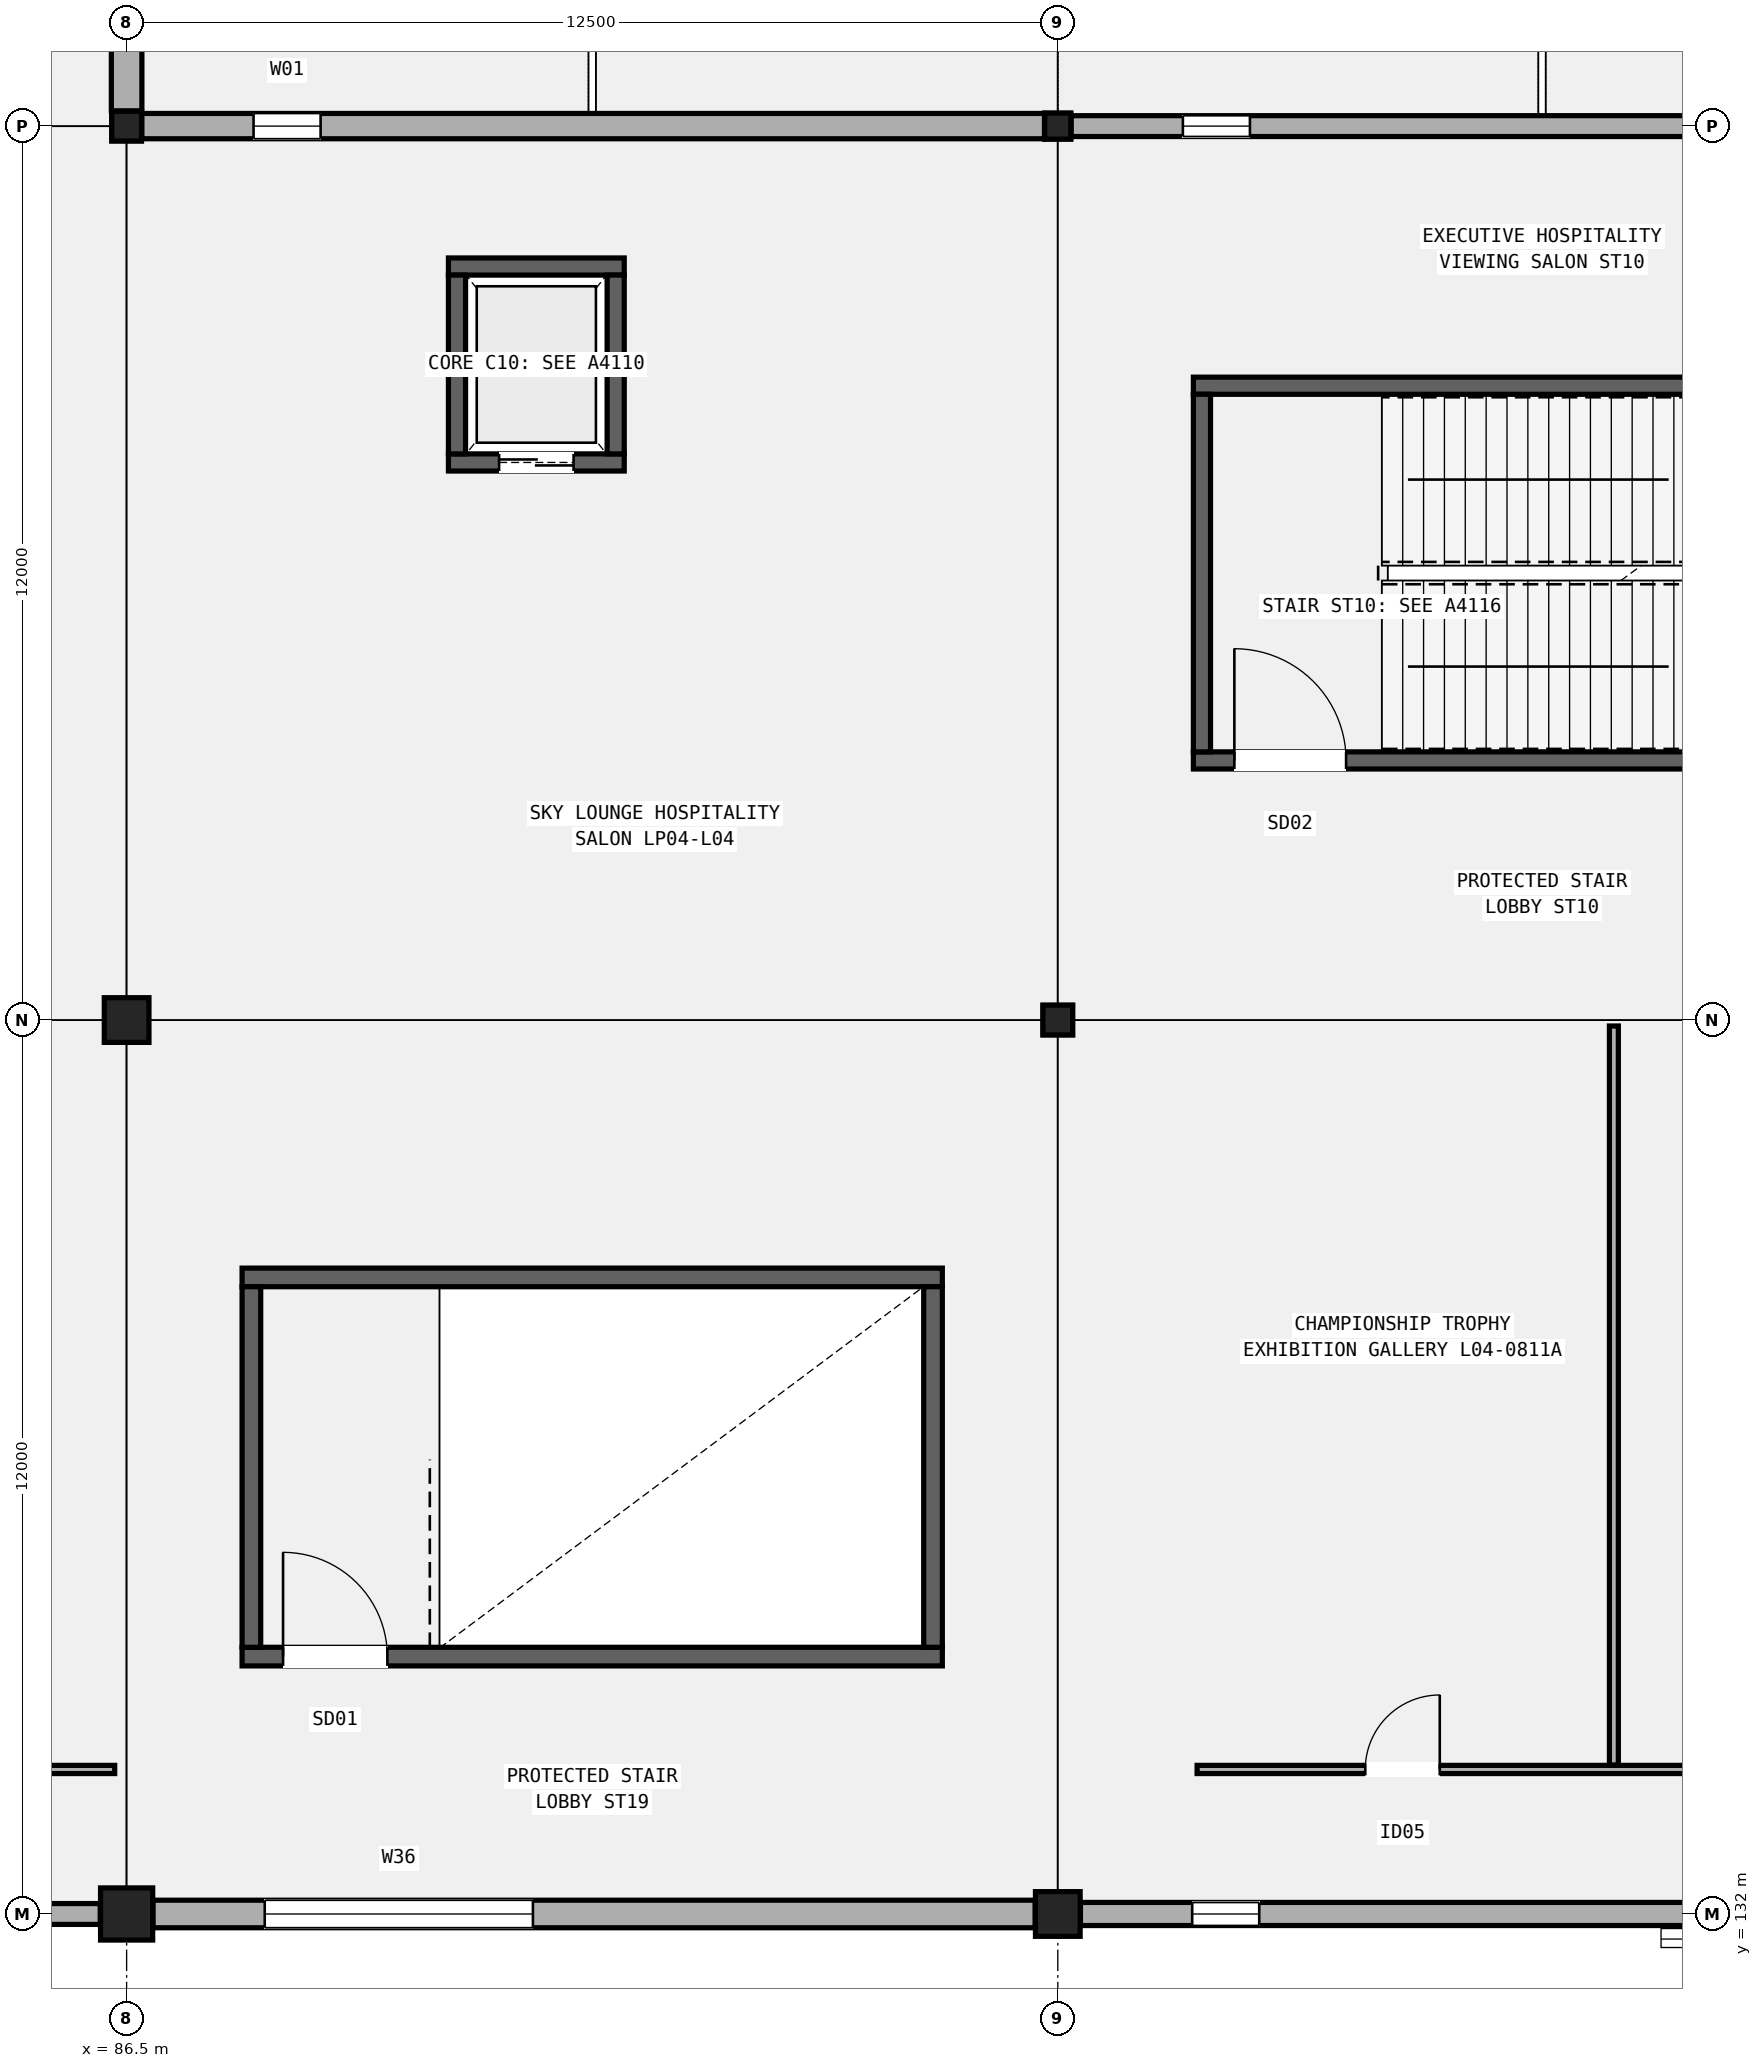
"""IFC4 building model, lengths in metres.
Left out: names, types, materials, properties, quantities, classifications, styles, units other than length and angle.
Written with IfcOpenShell. Run it as: python <this file> out.ifc"""

import sys

from ifc_helpers import new_model, si_unit, direction, frame, frame_2d, origin, origin_2d, place, context, subcontext, project, spatial, rectangle, hollow_rectangle, extrude, element, fill, save


model = new_model("IFC4")
c1 = context("Model", 3, precision=1e-05, world=origin(), true_north=direction((0.0, 1.0)))
c2 = subcontext(c1, "Body", "Model", "MODEL_VIEW")
j1 = project(units=[si_unit("LENGTHUNIT", "METRE"), si_unit("PLANEANGLEUNIT", "RADIAN")], contexts=[c1])
p1 = place(None, origin())
s1 = spatial("IfcSite", under=j1, at=p1, CompositionType="ELEMENT")
p2 = place(p1, origin())
s2 = spatial("IfcBuilding", under=s1, at=p2, CompositionType="ELEMENT")
p3 = place(p2, frame((0.0, 0.0, 20.4)))
s3 = spatial("IfcBuildingStorey", under=s2, at=p3, CompositionType="ELEMENT", Elevation=20.4)
p4 = place(p3, frame((86.5, 132.0, 0.0), z_axis=(0.0, 0.0, 1.0), x_axis=(1.0, 0.0, 0.0)))
e1 = element("IfcColumn", 1, at=p4, inside=s3, PredefinedType="COLUMN", context=c2, shape_type="SweptSolid", body=[
    extrude(rectangle(XDim=0.7, YDim=0.7, at=origin_2d()), origin(), (0.0, 0.0, 1.0), 5.4),
])
p5 = place(p3, frame((86.5, 144.0, 0.0), z_axis=(0.0, 0.0, 1.0), x_axis=(1.0, 0.0, 0.0)))
e2 = element("IfcColumn", 2, at=p5, inside=s3, PredefinedType="COLUMN", context=c2, shape_type="SweptSolid", body=[
    extrude(rectangle(XDim=0.6, YDim=0.6, at=origin_2d()), origin(), (0.0, 0.0, 1.0), 5.4),
])
p6 = place(p3, frame((86.5, 156.0, 0.0), z_axis=(0.0, 0.0, 1.0), x_axis=(1.0, 0.0, 0.0)))
e3 = element("IfcColumn", 3, at=p6, inside=s3, PredefinedType="COLUMN", context=c2, shape_type="SweptSolid", body=[
    extrude(hollow_rectangle(XDim=0.4, YDim=0.4, WallThickness=0.016, InnerFilletRadius=0.016, OuterFilletRadius=0.032, at=origin_2d()), origin(), (0.0, 0.0, 1.0), 5.4),
])
p7 = place(p3, frame((99.0, 132.0, 0.0), z_axis=(0.0, 0.0, 1.0), x_axis=(1.0, 0.0, 0.0)))
e4 = element("IfcColumn", 4, at=p7, inside=s3, PredefinedType="COLUMN", context=c2, shape_type="SweptSolid", body=[
    extrude(rectangle(XDim=0.6, YDim=0.6, at=origin_2d()), origin(), (0.0, 0.0, 1.0), 5.4),
])
p8 = place(p3, frame((99.0, 144.0, 0.0), z_axis=(0.0, 0.0, 1.0), x_axis=(1.0, 0.0, 0.0)))
e5 = element("IfcColumn", 5, at=p8, inside=s3, PredefinedType="COLUMN", context=c2, shape_type="SweptSolid", body=[
    extrude(hollow_rectangle(XDim=0.4, YDim=0.4, WallThickness=0.016, InnerFilletRadius=0.016, OuterFilletRadius=0.032, at=origin_2d()), origin(), (0.0, 0.0, 1.0), 5.4),
])
p9 = place(p3, frame((99.0, 156.0, 0.0), z_axis=(0.0, 0.0, 1.0), x_axis=(1.0, 0.0, 0.0)))
e6 = element("IfcColumn", 6, at=p9, inside=s3, PredefinedType="COLUMN", context=c2, shape_type="SweptSolid", body=[
    extrude(hollow_rectangle(XDim=0.35, YDim=0.35, WallThickness=0.016, InnerFilletRadius=0.016, OuterFilletRadius=0.032, at=origin_2d()), origin(), (0.0, 0.0, 1.0), 5.4),
])
p10 = place(p3, frame((74.179, 132.0, 0.0), z_axis=(0.0, 0.0, 1.0), x_axis=(1.0, 0.0, 0.0)))
e7 = element("IfcWall", 7, at=p10, inside=s3, PredefinedType="SOLIDWALL", context=c2, shape_type="SweptSolid", body=[
    extrude(rectangle(XDim=11.967, YDim=0.28, at=frame_2d((5.983, 0.0))), origin(), (0.0, 0.0, 1.0), 4.592),
])
p11 = place(p10, frame((1.5, 0.0, 0.95)))
e8 = element("IfcOpeningElement", 8, at=p11, cuts=e7, PredefinedType="OPENING", context=c2, shape_type="SweptSolid", body=[
    extrude(rectangle(XDim=3.3, YDim=1.8, at=frame_2d((1.65, 0.9))), frame((0.0, 0.15, 0.0), z_axis=(0.0, -1.0, 0.0), x_axis=(1.0, 0.0, 0.0)), (0.0, 0.0, 1.0), 0.3),
])
p12 = place(p3, frame((86.5, 156.204, 0.0), z_axis=(0.0, 0.0, 1.0), x_axis=(0.0, 1.0, 0.0)))
e9 = element("IfcWall", 9, at=p12, inside=s3, PredefinedType="SOLIDWALL", context=c2, shape_type="SweptSolid", body=[
    extrude(rectangle(XDim=11.617, YDim=0.41, at=frame_2d((5.809, 0.0))), origin(), (0.0, 0.0, 1.0), 4.592),
])
p13 = place(p12, frame((2.366, 0.0, 0.95)))
e10 = element("IfcOpeningElement", 10, at=p13, cuts=e9, PredefinedType="OPENING", context=c2, shape_type="SweptSolid", body=[
    extrude(rectangle(XDim=3.6, YDim=1.75, at=frame_2d((1.8, 0.875))), frame((0.0, 0.215, 0.0), z_axis=(0.0, -1.0, 0.0), x_axis=(1.0, 0.0, 0.0)), (0.0, 0.0, 1.0), 0.43),
])
p14 = place(p3, frame((86.854, 132.0, 0.0), z_axis=(0.0, 0.0, 1.0), x_axis=(1.0, 0.0, 0.0)))
e11 = element("IfcWall", 11, at=p14, inside=s3, PredefinedType="SOLIDWALL", context=c2, shape_type="SweptSolid", body=[
    extrude(rectangle(XDim=11.842, YDim=0.37, at=frame_2d((5.921, 0.0))), origin(), (0.0, 0.0, 1.0), 4.48),
])
p15 = place(p14, frame((1.5, 0.0, 0.95)))
e12 = element("IfcOpeningElement", 12, at=p15, cuts=e11, PredefinedType="OPENING", context=c2, shape_type="SweptSolid", body=[
    extrude(rectangle(XDim=3.6, YDim=2.15, at=frame_2d((1.8, 1.075))), frame((0.0, 0.195, 0.0), z_axis=(0.0, -1.0, 0.0), x_axis=(1.0, 0.0, 0.0)), (0.0, 0.0, 1.0), 0.39),
])
p16 = place(p3, frame((86.704, 156.0, 0.0), z_axis=(0.0, 0.0, 1.0), x_axis=(1.0, 0.0, 0.0)))
e13 = element("IfcWall", 13, at=p16, inside=s3, PredefinedType="SOLIDWALL", context=c2, shape_type="SweptSolid", body=[
    extrude(rectangle(XDim=12.117, YDim=0.34, at=frame_2d((6.059, 0.0))), origin(), (0.0, 0.0, 1.0), 4.592),
])
p17 = place(p16, frame((1.5, 0.0, 0.95)))
e14 = element("IfcOpeningElement", 14, at=p17, cuts=e13, PredefinedType="OPENING", context=c2, shape_type="SweptSolid", body=[
    extrude(rectangle(XDim=0.9, YDim=2.1, at=frame_2d((0.45, 1.05))), frame((0.0, 0.18, 0.0), z_axis=(0.0, -1.0, 0.0), x_axis=(1.0, 0.0, 0.0)), (0.0, 0.0, 1.0), 0.36),
])
p18 = place(p3, frame((99.304, 132.0, 0.0), z_axis=(0.0, 0.0, 1.0), x_axis=(1.0, 0.0, 0.0)))
e15 = element("IfcWall", 15, at=p18, inside=s3, PredefinedType="SOLIDWALL", context=c2, shape_type="SweptSolid", body=[
    extrude(rectangle(XDim=12.492, YDim=0.31, at=frame_2d((6.246, 0.0))), origin(), (0.0, 0.0, 1.0), 4.58),
])
p19 = place(p18, frame((1.5, 0.0, 0.95)))
e16 = element("IfcOpeningElement", 16, at=p19, cuts=e15, PredefinedType="OPENING", context=c2, shape_type="SweptSolid", body=[
    extrude(rectangle(XDim=0.9, YDim=2.4, at=frame_2d((0.45, 1.2))), frame((0.0, 0.165, 0.0), z_axis=(0.0, -1.0, 0.0), x_axis=(1.0, 0.0, 0.0)), (0.0, 0.0, 1.0), 0.33),
])
p20 = place(p3, frame((99.179, 156.0, 0.0), z_axis=(0.0, 0.0, 1.0), x_axis=(1.0, 0.0, 0.0)))
e17 = element("IfcWall", 17, at=p20, inside=s3, PredefinedType="SOLIDWALL", context=c2, shape_type="SweptSolid", body=[
    extrude(rectangle(XDim=12.667, YDim=0.28, at=frame_2d((6.333, 0.0))), origin(), (0.0, 0.0, 1.0), 4.48),
])
p21 = place(p20, frame((1.5, 0.0, 0.95)))
e18 = element("IfcOpeningElement", 18, at=p21, cuts=e17, PredefinedType="OPENING", context=c2, shape_type="SweptSolid", body=[
    extrude(rectangle(XDim=0.9, YDim=2.7, at=frame_2d((0.45, 1.35))), frame((0.0, 0.15, 0.0), z_axis=(0.0, -1.0, 0.0), x_axis=(1.0, 0.0, 0.0)), (0.0, 0.0, 1.0), 0.3),
])
p22 = place(p3, frame((100.82, 147.485, 0.0), z_axis=(0.0, 0.0, 1.0), x_axis=(1.0, 0.0, 0.0)))
e19 = element("IfcWall", 19, at=p22, inside=s3, PredefinedType="SHEAR", context=c2, shape_type="SweptSolid", body=[
    extrude(rectangle(XDim=9.36, YDim=0.23, at=frame_2d((4.68, 0.0))), origin(), (0.0, 0.0, 1.0), 5.18),
])
p23 = place(p22, frame((0.55, 0.0, 0.0)))
e20 = element("IfcOpeningElement", 20, at=p23, cuts=e19, PredefinedType="OPENING", context=c2, shape_type="SweptSolid", body=[
    extrude(rectangle(XDim=1.5, YDim=2.2, at=frame_2d((0.75, 1.1))), frame((0.0, 0.125, 0.0), z_axis=(0.0, -1.0, 0.0), x_axis=(1.0, 0.0, 0.0)), (0.0, 0.0, 1.0), 0.25),
])
p24 = place(p3, frame((100.82, 152.515, 0.0), z_axis=(0.0, 0.0, 1.0), x_axis=(1.0, 0.0, 0.0)))
e21 = element("IfcWall", 21, at=p24, inside=s3, PredefinedType="SHEAR", context=c2, shape_type="SweptSolid", body=[
    extrude(rectangle(XDim=9.36, YDim=0.23, at=frame_2d((4.68, 0.0))), origin(), (0.0, 0.0, 1.0), 5.18),
])
p25 = place(p3, frame((100.935, 147.6, 0.0), z_axis=(0.0, 0.0, 1.0), x_axis=(0.0, 1.0, 0.0)))
e22 = element("IfcWall", 22, at=p25, inside=s3, PredefinedType="SHEAR", context=c2, shape_type="SweptSolid", body=[
    extrude(rectangle(XDim=4.8, YDim=0.23, at=frame_2d((2.4, 0.0))), origin(), (0.0, 0.0, 1.0), 5.18),
])
p26 = place(p3, frame((88.05, 135.455, 0.0), z_axis=(0.0, 0.0, 1.0), x_axis=(1.0, 0.0, 0.0)))
e23 = element("IfcWall", 23, at=p26, inside=s3, PredefinedType="SHEAR", context=c2, shape_type="SweptSolid", body=[
    extrude(rectangle(XDim=9.4, YDim=0.25, at=frame_2d((4.7, 0.0))), origin(), (0.0, 0.0, 1.0), 5.18),
])
p27 = place(p26, frame((0.55, 0.0, 0.0)))
e24 = element("IfcOpeningElement", 24, at=p27, cuts=e23, PredefinedType="OPENING", context=c2, shape_type="SweptSolid", body=[
    extrude(rectangle(XDim=1.4, YDim=2.15, at=frame_2d((0.7, 1.075))), frame((0.0, 0.135, 0.0), z_axis=(0.0, -1.0, 0.0), x_axis=(1.0, 0.0, 0.0)), (0.0, 0.0, 1.0), 0.27),
])
p28 = place(p3, frame((88.05, 140.545, 0.0), z_axis=(0.0, 0.0, 1.0), x_axis=(1.0, 0.0, 0.0)))
e25 = element("IfcWall", 25, at=p28, inside=s3, PredefinedType="SHEAR", context=c2, shape_type="SweptSolid", body=[
    extrude(rectangle(XDim=9.4, YDim=0.25, at=frame_2d((4.7, 0.0))), origin(), (0.0, 0.0, 1.0), 5.18),
])
for number, where, z_axis, x_axis in (
    (26, (88.175, 135.58, 0.0), (0.0, 0.0, 1.0), (0.0, 1.0, 0.0)),
    (27, (97.325, 135.58, 0.0), (0.0, 0.0, 1.0), (0.0, 1.0, 0.0)),
):
    element("IfcWall", number, at=place(p3, frame(where, z_axis=z_axis, x_axis=x_axis)), inside=s3, PredefinedType="SHEAR", context=c2, shape_type="SweptSolid", body=[
        extrude(rectangle(XDim=4.84, YDim=0.25, at=frame_2d((2.42, 0.0))), origin(), (0.0, 0.0, 1.0), 5.18),
    ])
p29 = place(p3, frame((90.82, 151.485, 0.0), z_axis=(0.0, 0.0, 1.0), x_axis=(1.0, 0.0, 0.0)))
e28 = element("IfcWall", 28, at=p29, inside=s3, PredefinedType="SHEAR", context=c2, shape_type="SweptSolid", body=[
    extrude(rectangle(XDim=2.36, YDim=0.23, at=frame_2d((1.18, 0.0))), origin(), (0.0, 0.0, 1.0), 5.18),
])
p30 = place(p29, frame((0.68, 0.0, 0.0)))
e29 = element("IfcOpeningElement", 29, at=p30, cuts=e28, PredefinedType="OPENING", context=c2, shape_type="SweptSolid", body=[
    extrude(rectangle(XDim=1.0, YDim=2.15, at=frame_2d((0.5, 1.075))), frame((0.0, 0.125, 0.0), z_axis=(0.0, -1.0, 0.0), x_axis=(1.0, 0.0, 0.0)), (0.0, 0.0, 1.0), 0.25),
])
p31 = place(p3, frame((90.82, 154.115, 0.0), z_axis=(0.0, 0.0, 1.0), x_axis=(1.0, 0.0, 0.0)))
e30 = element("IfcWall", 30, at=p31, inside=s3, PredefinedType="SHEAR", context=c2, shape_type="SweptSolid", body=[
    extrude(rectangle(XDim=2.36, YDim=0.23, at=frame_2d((1.18, 0.0))), origin(), (0.0, 0.0, 1.0), 5.18),
])
for number, where, z_axis, x_axis in (
    (31, (90.935, 151.6, 0.0), (0.0, 0.0, 1.0), (0.0, 1.0, 0.0)),
    (32, (93.065, 151.6, 0.0), (0.0, 0.0, 1.0), (0.0, 1.0, 0.0)),
):
    element("IfcWall", number, at=place(p3, frame(where, z_axis=z_axis, x_axis=x_axis)), inside=s3, PredefinedType="SHEAR", context=c2, shape_type="SweptSolid", body=[
        extrude(rectangle(XDim=2.4, YDim=0.23, at=frame_2d((1.2, 0.0))), origin(), (0.0, 0.0, 1.0), 5.18),
    ])
p32 = place(p3, frame((74.16, 133.94, 0.0), z_axis=(0.0, 0.0, 1.0), x_axis=(1.0, 0.0, 0.0)))
e33 = element("IfcWall", 33, at=p32, inside=s3, PredefinedType="PARTITIONING", context=c2, shape_type="SweptSolid", body=[
    extrude(rectangle(XDim=12.18, YDim=0.11, at=frame_2d((6.09, 0.0))), origin(), (0.0, 0.0, 1.0), 4.52),
])
p33 = place(p32, frame((2.302, 0.0, 0.0)))
e34 = element("IfcOpeningElement", 34, at=p33, cuts=e33, PredefinedType="OPENING", context=c2, shape_type="SweptSolid", body=[
    extrude(rectangle(XDim=0.92, YDim=2.1, at=frame_2d((0.46, 1.05))), frame((0.0, 0.065, 0.0), z_axis=(0.0, -1.0, 0.0), x_axis=(1.0, 0.0, 0.0)), (0.0, 0.0, 1.0), 0.13),
])
p34 = place(p32, frame((8.456, 0.0, 0.0)))
e35 = element("IfcOpeningElement", 35, at=p34, cuts=e33, PredefinedType="OPENING", context=c2, shape_type="SweptSolid", body=[
    extrude(rectangle(XDim=0.95, YDim=2.12, at=frame_2d((0.475, 1.06))), frame((0.0, 0.065, 0.0), z_axis=(0.0, -1.0, 0.0), x_axis=(1.0, 0.0, 0.0)), (0.0, 0.0, 1.0), 0.13),
])
p35 = place(p3, frame((100.87, 133.94, 0.0), z_axis=(0.0, 0.0, 1.0), x_axis=(1.0, 0.0, 0.0)))
e36 = element("IfcWall", 36, at=p35, inside=s3, PredefinedType="PARTITIONING", context=c2, shape_type="SweptSolid", body=[
    extrude(rectangle(XDim=10.97, YDim=0.11, at=frame_2d((5.485, 0.0))), origin(), (0.0, 0.0, 1.0), 4.52),
])
p36 = place(p35, frame((2.257, 0.0, 0.0)))
e37 = element("IfcOpeningElement", 37, at=p36, cuts=e36, PredefinedType="OPENING", context=c2, shape_type="SweptSolid", body=[
    extrude(rectangle(XDim=1.0, YDim=2.14, at=frame_2d((0.5, 1.07))), frame((0.0, 0.065, 0.0), z_axis=(0.0, -1.0, 0.0), x_axis=(1.0, 0.0, 0.0)), (0.0, 0.0, 1.0), 0.13),
])
p37 = place(p35, frame((7.807, 0.0, 0.0)))
e38 = element("IfcOpeningElement", 38, at=p37, cuts=e36, PredefinedType="OPENING", context=c2, shape_type="SweptSolid", body=[
    extrude(rectangle(XDim=1.03, YDim=2.12, at=frame_2d((0.515, 1.06))), frame((0.0, 0.065, 0.0), z_axis=(0.0, -1.0, 0.0), x_axis=(1.0, 0.0, 0.0)), (0.0, 0.0, 1.0), 0.13),
])
p38 = place(p3, frame((106.465, 134.0, 0.0), z_axis=(0.0, 0.0, 1.0), x_axis=(0.0, 1.0, 0.0)))
e39 = element("IfcWall", 39, at=p38, inside=s3, PredefinedType="PARTITIONING", context=c2, shape_type="SweptSolid", body=[
    extrude(rectangle(XDim=9.92, YDim=0.12, at=frame_2d((4.96, 0.0))), origin(), (0.0, 0.0, 1.0), 4.52),
])
p39 = place(p15, origin())
e40 = element("IfcWindow", 40, at=p39, inside=s3, PartitioningType="SINGLE_PANEL", PredefinedType="WINDOW", context=c2, shape_type="SweptSolid", body=[
    extrude(rectangle(XDim=3.6, YDim=2.15, at=frame_2d((1.8, 1.075))), frame((0.0, 0.03, 0.0), z_axis=(0.0, -1.0, 0.0), x_axis=(1.0, 0.0, 0.0)), (0.0, 0.0, 1.0), 0.06),
])
fill(e12, e40)
p40 = place(p17, origin())
e41 = element("IfcWindow", 41, at=p40, inside=s3, PartitioningType="SINGLE_PANEL", PredefinedType="WINDOW", context=c2, shape_type="SweptSolid", body=[
    extrude(rectangle(XDim=0.9, YDim=2.1, at=frame_2d((0.45, 1.05))), frame((0.0, 0.03, 0.0), z_axis=(0.0, -1.0, 0.0), x_axis=(1.0, 0.0, 0.0)), (0.0, 0.0, 1.0), 0.06),
])
fill(e14, e41)
p41 = place(p19, origin())
e42 = element("IfcWindow", 42, at=p41, inside=s3, PartitioningType="SINGLE_PANEL", PredefinedType="WINDOW", context=c2, shape_type="SweptSolid", body=[
    extrude(rectangle(XDim=0.9, YDim=2.4, at=frame_2d((0.45, 1.2))), frame((0.0, 0.03, 0.0), z_axis=(0.0, -1.0, 0.0), x_axis=(1.0, 0.0, 0.0)), (0.0, 0.0, 1.0), 0.06),
])
fill(e16, e42)
p42 = place(p21, origin())
e43 = element("IfcWindow", 43, at=p42, inside=s3, PartitioningType="SINGLE_PANEL", PredefinedType="WINDOW", context=c2, shape_type="SweptSolid", body=[
    extrude(rectangle(XDim=0.9, YDim=2.7, at=frame_2d((0.45, 1.35))), frame((0.0, 0.03, 0.0), z_axis=(0.0, -1.0, 0.0), x_axis=(1.0, 0.0, 0.0)), (0.0, 0.0, 1.0), 0.06),
])
fill(e18, e43)
p43 = place(p23, origin())
e44 = element("IfcDoor", 44, at=p43, inside=s3, OperationType="SINGLE_SWING_LEFT", PredefinedType="DOOR", context=c2, shape_type="SweptSolid", body=[
    extrude(rectangle(XDim=1.5, YDim=2.2, at=frame_2d((0.75, 1.1))), frame((0.0, 0.025, 0.0), z_axis=(0.0, -1.0, 0.0), x_axis=(1.0, 0.0, 0.0)), (0.0, 0.0, 1.0), 0.05),
])
fill(e20, e44)
p44 = place(p27, origin())
e45 = element("IfcDoor", 45, at=p44, inside=s3, OperationType="SINGLE_SWING_LEFT", PredefinedType="DOOR", context=c2, shape_type="SweptSolid", body=[
    extrude(rectangle(XDim=1.4, YDim=2.15, at=frame_2d((0.7, 1.075))), frame((0.0, 0.025, 0.0), z_axis=(0.0, -1.0, 0.0), x_axis=(1.0, 0.0, 0.0)), (0.0, 0.0, 1.0), 0.05),
])
fill(e24, e45)
p45 = place(p30, origin())
e46 = element("IfcDoor", 46, at=p45, inside=s3, OperationType="DOUBLE_DOOR_SLIDING", PredefinedType="DOOR", context=c2, shape_type="SweptSolid", body=[
    extrude(rectangle(XDim=1.0, YDim=2.15, at=frame_2d((0.5, 1.075))), frame((0.0, 0.025, 0.0), z_axis=(0.0, -1.0, 0.0), x_axis=(1.0, 0.0, 0.0)), (0.0, 0.0, 1.0), 0.05),
])
fill(e29, e46)
p46 = place(p36, origin())
e47 = element("IfcDoor", 47, at=p46, inside=s3, OperationType="SINGLE_SWING_RIGHT", PredefinedType="DOOR", context=c2, shape_type="SweptSolid", body=[
    extrude(rectangle(XDim=1.0, YDim=2.14, at=frame_2d((0.5, 1.07))), frame((0.0, 0.025, 0.0), z_axis=(0.0, -1.0, 0.0), x_axis=(1.0, 0.0, 0.0)), (0.0, 0.0, 1.0), 0.05),
])
fill(e37, e47)
save(model, sys.argv[1])
